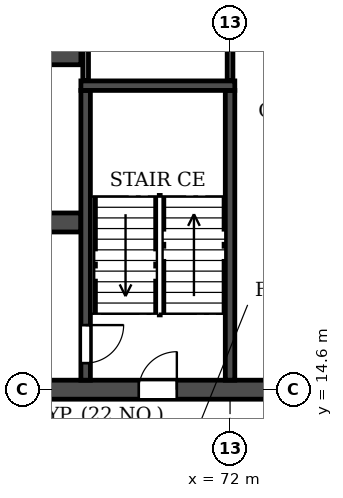
"""IFC4 building model, lengths in metres.
Left out: names, types, materials, properties, quantities, classifications, styles, units other than length and angle.
Written with IfcOpenShell. Run it as: python <this file> out.ifc"""

import sys

from ifc_helpers import new_model, si_unit, direction, frame, frame_2d, origin, place, context, subcontext, project, spatial, rectangle, extrude, element, fill, save


model = new_model("IFC4")
c1 = context("Model", 3, precision=1e-05, world=origin(), true_north=direction((0.0, 1.0)))
c2 = subcontext(c1, "Body", "Model", "MODEL_VIEW")
j1 = project(units=[si_unit("LENGTHUNIT", "METRE"), si_unit("PLANEANGLEUNIT", "RADIAN")], contexts=[c1])
p1 = place(None, origin())
s1 = spatial("IfcSite", under=j1, at=p1, CompositionType="ELEMENT")
p2 = place(p1, origin())
s2 = spatial("IfcBuilding", under=s1, at=p2, CompositionType="ELEMENT")
p3 = place(p2, frame((0.0, 0.0, 109.2)))
s3 = spatial("IfcBuildingStorey", under=s2, at=p3, CompositionType="ELEMENT", Elevation=109.2)
p4 = place(p3, frame((14.6, 14.6, 0.0), z_axis=(0.0, 0.0, 1.0), x_axis=(1.0, 0.0, 0.0)))
e1 = element("IfcWall", 1, at=p4, inside=s3, PredefinedType="SOLIDWALL", context=c2, shape_type="SweptSolid", body=[
    extrude(rectangle(XDim=72.8, YDim=0.5, at=frame_2d((36.4, 0.0))), origin(), (0.0, 0.0, 1.0), 3.06),
])
p5 = place(p4, frame((1.2, 0.0, 0.0)))
e2 = element("IfcOpeningElement", 2, at=p5, cuts=e1, PredefinedType="OPENING", context=c2, shape_type="SweptSolid", body=[
    extrude(rectangle(XDim=1.0, YDim=2.1, at=frame_2d((0.5, 1.05))), frame((0.0, 0.26, 0.0), z_axis=(0.0, -1.0, 0.0), x_axis=(1.0, 0.0, 0.0)), (0.0, 0.0, 1.0), 0.52),
])
p6 = place(p4, frame((4.3, 0.0, 0.0)))
e3 = element("IfcOpeningElement", 3, at=p6, cuts=e1, PredefinedType="OPENING", context=c2, shape_type="SweptSolid", body=[
    extrude(rectangle(XDim=1.0, YDim=2.1, at=frame_2d((0.5, 1.05))), frame((0.0, 0.26, 0.0), z_axis=(0.0, -1.0, 0.0), x_axis=(1.0, 0.0, 0.0)), (0.0, 0.0, 1.0), 0.52),
])
p7 = place(p4, frame((12.2, 0.0, 0.0)))
e4 = element("IfcOpeningElement", 4, at=p7, cuts=e1, PredefinedType="OPENING", context=c2, shape_type="SweptSolid", body=[
    extrude(rectangle(XDim=1.0, YDim=2.1, at=frame_2d((0.5, 1.05))), frame((0.0, 0.26, 0.0), z_axis=(0.0, -1.0, 0.0), x_axis=(1.0, 0.0, 0.0)), (0.0, 0.0, 1.0), 0.52),
])
p8 = place(p4, frame((16.8, 0.0, 0.0)))
e5 = element("IfcOpeningElement", 5, at=p8, cuts=e1, PredefinedType="OPENING", context=c2, shape_type="SweptSolid", body=[
    extrude(rectangle(XDim=1.0, YDim=2.1, at=frame_2d((0.5, 1.05))), frame((0.0, 0.26, 0.0), z_axis=(0.0, -1.0, 0.0), x_axis=(1.0, 0.0, 0.0)), (0.0, 0.0, 1.0), 0.52),
])
p9 = place(p4, frame((28.1, 0.0, 0.0)))
e6 = element("IfcOpeningElement", 6, at=p9, cuts=e1, PredefinedType="OPENING", context=c2, shape_type="SweptSolid", body=[
    extrude(rectangle(XDim=1.0, YDim=2.1, at=frame_2d((0.5, 1.05))), frame((0.0, 0.26, 0.0), z_axis=(0.0, -1.0, 0.0), x_axis=(1.0, 0.0, 0.0)), (0.0, 0.0, 1.0), 0.52),
])
p10 = place(p4, frame((32.0, 0.0, 0.0)))
e7 = element("IfcOpeningElement", 7, at=p10, cuts=e1, PredefinedType="OPENING", context=c2, shape_type="SweptSolid", body=[
    extrude(rectangle(XDim=1.0, YDim=2.1, at=frame_2d((0.5, 1.05))), frame((0.0, 0.26, 0.0), z_axis=(0.0, -1.0, 0.0), x_axis=(1.0, 0.0, 0.0)), (0.0, 0.0, 1.0), 0.52),
])
p11 = place(p4, frame((35.9, 0.0, 0.0)))
e8 = element("IfcOpeningElement", 8, at=p11, cuts=e1, PredefinedType="OPENING", context=c2, shape_type="SweptSolid", body=[
    extrude(rectangle(XDim=1.0, YDim=2.1, at=frame_2d((0.5, 1.05))), frame((0.0, 0.26, 0.0), z_axis=(0.0, -1.0, 0.0), x_axis=(1.0, 0.0, 0.0)), (0.0, 0.0, 1.0), 0.52),
])
p12 = place(p4, frame((39.8, 0.0, 0.0)))
e9 = element("IfcOpeningElement", 9, at=p12, cuts=e1, PredefinedType="OPENING", context=c2, shape_type="SweptSolid", body=[
    extrude(rectangle(XDim=1.0, YDim=2.1, at=frame_2d((0.5, 1.05))), frame((0.0, 0.26, 0.0), z_axis=(0.0, -1.0, 0.0), x_axis=(1.0, 0.0, 0.0)), (0.0, 0.0, 1.0), 0.52),
])
p13 = place(p4, frame((43.7, 0.0, 0.0)))
e10 = element("IfcOpeningElement", 10, at=p13, cuts=e1, PredefinedType="OPENING", context=c2, shape_type="SweptSolid", body=[
    extrude(rectangle(XDim=1.0, YDim=2.1, at=frame_2d((0.5, 1.05))), frame((0.0, 0.26, 0.0), z_axis=(0.0, -1.0, 0.0), x_axis=(1.0, 0.0, 0.0)), (0.0, 0.0, 1.0), 0.52),
])
p14 = place(p4, frame((55.0, 0.0, 0.0)))
e11 = element("IfcOpeningElement", 11, at=p14, cuts=e1, PredefinedType="OPENING", context=c2, shape_type="SweptSolid", body=[
    extrude(rectangle(XDim=1.0, YDim=2.1, at=frame_2d((0.5, 1.05))), frame((0.0, 0.26, 0.0), z_axis=(0.0, -1.0, 0.0), x_axis=(1.0, 0.0, 0.0)), (0.0, 0.0, 1.0), 0.52),
])
p15 = place(p4, frame((59.6, 0.0, 0.0)))
e12 = element("IfcOpeningElement", 12, at=p15, cuts=e1, PredefinedType="OPENING", context=c2, shape_type="SweptSolid", body=[
    extrude(rectangle(XDim=1.0, YDim=2.1, at=frame_2d((0.5, 1.05))), frame((0.0, 0.26, 0.0), z_axis=(0.0, -1.0, 0.0), x_axis=(1.0, 0.0, 0.0)), (0.0, 0.0, 1.0), 0.52),
])
p16 = place(p4, frame((67.5, 0.0, 0.0)))
e13 = element("IfcOpeningElement", 13, at=p16, cuts=e1, PredefinedType="OPENING", context=c2, shape_type="SweptSolid", body=[
    extrude(rectangle(XDim=1.0, YDim=2.1, at=frame_2d((0.5, 1.05))), frame((0.0, 0.26, 0.0), z_axis=(0.0, -1.0, 0.0), x_axis=(1.0, 0.0, 0.0)), (0.0, 0.0, 1.0), 0.52),
])
p17 = place(p4, frame((70.35, 0.0, 0.0)))
e14 = element("IfcOpeningElement", 14, at=p17, cuts=e1, PredefinedType="OPENING", context=c2, shape_type="SweptSolid", body=[
    extrude(rectangle(XDim=1.5, YDim=2.1, at=frame_2d((0.75, 1.05))), frame((0.0, 0.26, 0.0), z_axis=(0.0, -1.0, 0.0), x_axis=(1.0, 0.0, 0.0)), (0.0, 0.0, 1.0), 0.52),
])
p18 = place(p3, frame((33.925, 19.0, 0.0), z_axis=(0.0, 0.0, 1.0), x_axis=(1.0, 0.0, 0.0)))
e15 = element("IfcWall", 15, at=p18, inside=s3, PredefinedType="SOLIDWALL", context=c2, shape_type="SweptSolid", body=[
    extrude(rectangle(XDim=34.15, YDim=0.5, at=frame_2d((17.075, 0.0))), origin(), (0.0, 0.0, 1.0), 3.06),
])
p19 = place(p18, frame((16.175, 0.0, 0.0)))
e16 = element("IfcOpeningElement", 16, at=p19, cuts=e15, PredefinedType="OPENING", context=c2, shape_type="SweptSolid", body=[
    extrude(rectangle(XDim=1.8, YDim=2.1, at=frame_2d((0.9, 1.05))), frame((0.0, 0.26, 0.0), z_axis=(0.0, -1.0, 0.0), x_axis=(1.0, 0.0, 0.0)), (0.0, 0.0, 1.0), 0.52),
])
p20 = place(p18, frame((1.525, 0.0, 0.0)))
e17 = element("IfcOpeningElement", 17, at=p20, cuts=e15, PredefinedType="OPENING", context=c2, shape_type="SweptSolid", body=[
    extrude(rectangle(XDim=1.8, YDim=2.1, at=frame_2d((0.9, 1.05))), frame((0.0, 0.26, 0.0), z_axis=(0.0, -1.0, 0.0), x_axis=(1.0, 0.0, 0.0)), (0.0, 0.0, 1.0), 0.52),
])
p21 = place(p18, frame((8.725, 0.0, 0.0)))
e18 = element("IfcOpeningElement", 18, at=p21, cuts=e15, PredefinedType="OPENING", context=c2, shape_type="SweptSolid", body=[
    extrude(rectangle(XDim=1.1, YDim=2.1, at=frame_2d((0.55, 1.05))), frame((0.0, 0.26, 0.0), z_axis=(0.0, -1.0, 0.0), x_axis=(1.0, 0.0, 0.0)), (0.0, 0.0, 1.0), 0.52),
])
p22 = place(p18, frame((11.325, 0.0, 0.0)))
e19 = element("IfcOpeningElement", 19, at=p22, cuts=e15, PredefinedType="OPENING", context=c2, shape_type="SweptSolid", body=[
    extrude(rectangle(XDim=1.1, YDim=2.1, at=frame_2d((0.55, 1.05))), frame((0.0, 0.26, 0.0), z_axis=(0.0, -1.0, 0.0), x_axis=(1.0, 0.0, 0.0)), (0.0, 0.0, 1.0), 0.52),
])
p23 = place(p18, frame((13.925, 0.0, 0.0)))
e20 = element("IfcOpeningElement", 20, at=p23, cuts=e15, PredefinedType="OPENING", context=c2, shape_type="SweptSolid", body=[
    extrude(rectangle(XDim=1.1, YDim=2.1, at=frame_2d((0.55, 1.05))), frame((0.0, 0.26, 0.0), z_axis=(0.0, -1.0, 0.0), x_axis=(1.0, 0.0, 0.0)), (0.0, 0.0, 1.0), 0.52),
])
p24 = place(p18, frame((19.125, 0.0, 0.0)))
e21 = element("IfcOpeningElement", 21, at=p24, cuts=e15, PredefinedType="OPENING", context=c2, shape_type="SweptSolid", body=[
    extrude(rectangle(XDim=1.1, YDim=2.1, at=frame_2d((0.55, 1.05))), frame((0.0, 0.26, 0.0), z_axis=(0.0, -1.0, 0.0), x_axis=(1.0, 0.0, 0.0)), (0.0, 0.0, 1.0), 0.52),
])
p25 = place(p18, frame((21.725, 0.0, 0.0)))
e22 = element("IfcOpeningElement", 22, at=p25, cuts=e15, PredefinedType="OPENING", context=c2, shape_type="SweptSolid", body=[
    extrude(rectangle(XDim=1.1, YDim=2.1, at=frame_2d((0.55, 1.05))), frame((0.0, 0.26, 0.0), z_axis=(0.0, -1.0, 0.0), x_axis=(1.0, 0.0, 0.0)), (0.0, 0.0, 1.0), 0.52),
])
p26 = place(p18, frame((24.325, 0.0, 0.0)))
e23 = element("IfcOpeningElement", 23, at=p26, cuts=e15, PredefinedType="OPENING", context=c2, shape_type="SweptSolid", body=[
    extrude(rectangle(XDim=1.1, YDim=2.1, at=frame_2d((0.55, 1.05))), frame((0.0, 0.26, 0.0), z_axis=(0.0, -1.0, 0.0), x_axis=(1.0, 0.0, 0.0)), (0.0, 0.0, 1.0), 0.52),
])
p27 = place(p18, frame((30.825, 0.0, 0.0)))
e24 = element("IfcOpeningElement", 24, at=p27, cuts=e15, PredefinedType="OPENING", context=c2, shape_type="SweptSolid", body=[
    extrude(rectangle(XDim=1.8, YDim=2.1, at=frame_2d((0.9, 1.05))), frame((0.0, 0.26, 0.0), z_axis=(0.0, -1.0, 0.0), x_axis=(1.0, 0.0, 0.0)), (0.0, 0.0, 1.0), 0.52),
])
p28 = place(p3, frame((33.925, 23.4, 0.0), z_axis=(0.0, 0.0, 1.0), x_axis=(1.0, 0.0, 0.0)))
e25 = element("IfcWall", 25, at=p28, inside=s3, PredefinedType="SOLIDWALL", context=c2, shape_type="SweptSolid", body=[
    extrude(rectangle(XDim=34.15, YDim=0.5, at=frame_2d((17.075, 0.0))), origin(), (0.0, 0.0, 1.0), 3.06),
])
p29 = place(p28, frame((16.175, 0.0, 0.0)))
e26 = element("IfcOpeningElement", 26, at=p29, cuts=e25, PredefinedType="OPENING", context=c2, shape_type="SweptSolid", body=[
    extrude(rectangle(XDim=1.8, YDim=2.1, at=frame_2d((0.9, 1.05))), frame((0.0, 0.26, 0.0), z_axis=(0.0, -1.0, 0.0), x_axis=(1.0, 0.0, 0.0)), (0.0, 0.0, 1.0), 0.52),
])
p30 = place(p28, frame((11.025, 0.0, 0.0)))
e27 = element("IfcOpeningElement", 27, at=p30, cuts=e25, PredefinedType="OPENING", context=c2, shape_type="SweptSolid", body=[
    extrude(rectangle(XDim=1.1, YDim=2.1, at=frame_2d((0.55, 1.05))), frame((0.0, 0.26, 0.0), z_axis=(0.0, -1.0, 0.0), x_axis=(1.0, 0.0, 0.0)), (0.0, 0.0, 1.0), 0.52),
])
p31 = place(p3, frame((68.2, 14.85, 0.0), z_axis=(0.0, 0.0, 1.0), x_axis=(0.0, 1.0, 0.0)))
e28 = element("IfcWall", 28, at=p31, inside=s3, PredefinedType="SOLIDWALL", context=c2, shape_type="SweptSolid", body=[
    extrude(rectangle(XDim=7.625, YDim=0.25, at=frame_2d((3.812, 0.0))), origin(), (0.0, 0.0, 1.0), 3.06),
])
p32 = place(p31, frame((0.45, 0.0, 0.0)))
e29 = element("IfcOpeningElement", 29, at=p32, cuts=e28, PredefinedType="OPENING", context=c2, shape_type="SweptSolid", body=[
    extrude(rectangle(XDim=1.0, YDim=2.1, at=frame_2d((0.5, 1.05))), frame((0.0, 0.135, 0.0), z_axis=(0.0, -1.0, 0.0), x_axis=(1.0, 0.0, 0.0)), (0.0, 0.0, 1.0), 0.27),
])
p33 = place(p3, frame((72.0, 14.85, 0.0), z_axis=(0.0, 0.0, 1.0), x_axis=(0.0, 1.0, 0.0)))
e30 = element("IfcWall", 30, at=p33, inside=s3, PredefinedType="SOLIDWALL", context=c2, shape_type="SweptSolid", body=[
    extrude(rectangle(XDim=7.625, YDim=0.25, at=frame_2d((3.812, 0.0))), origin(), (0.0, 0.0, 1.0), 3.06),
])
p34 = place(p3, frame((68.075, 22.6, 0.0), z_axis=(0.0, 0.0, 1.0), x_axis=(1.0, 0.0, 0.0)))
e31 = element("IfcWall", 31, at=p34, inside=s3, PredefinedType="SOLIDWALL", context=c2, shape_type="SweptSolid", body=[
    extrude(rectangle(XDim=4.05, YDim=0.25, at=frame_2d((2.025, 0.0))), origin(), (0.0, 0.0, 1.0), 3.06),
])
for number, where, z_axis, x_axis in (
    (32, (68.2, 22.735, 0.0), (0.0, 0.0, 1.0), (0.0, 1.0, 0.0)),
    (33, (72.0, 22.735, 0.0), (0.0, 0.0, 1.0), (0.0, 1.0, 0.0)),
):
    element("IfcWall", number, at=place(p3, frame(where, z_axis=z_axis, x_axis=x_axis)), inside=s3, PredefinedType="PARTITIONING", context=c2, shape_type="SweptSolid", body=[
        extrude(rectangle(XDim=4.805, YDim=0.15, at=frame_2d((2.402, 0.0))), origin(), (0.0, 0.0, 1.0), 3.06),
    ])
p35 = place(p14, origin())
e34 = element("IfcDoor", 34, at=p35, inside=s3, OperationType="SINGLE_SWING_RIGHT", PredefinedType="DOOR", context=c2, shape_type="SweptSolid", body=[
    extrude(rectangle(XDim=1.0, YDim=2.1, at=frame_2d((0.5, 1.05))), frame((0.0, 0.025, 0.0), z_axis=(0.0, -1.0, 0.0), x_axis=(1.0, 0.0, 0.0)), (0.0, 0.0, 1.0), 0.05),
])
fill(e11, e34)
p36 = place(p32, frame((1.0, 0.0, 0.0), z_axis=(0.0, 0.0, 1.0), x_axis=(-1.0, 0.0, 0.0)))
e35 = element("IfcDoor", 35, at=p36, inside=s3, OperationType="SINGLE_SWING_LEFT", PredefinedType="DOOR", context=c2, shape_type="SweptSolid", body=[
    extrude(rectangle(XDim=1.0, YDim=2.1, at=frame_2d((0.5, 1.05))), frame((0.0, 0.025, 0.0), z_axis=(0.0, -1.0, 0.0), x_axis=(1.0, 0.0, 0.0)), (0.0, 0.0, 1.0), 0.05),
])
fill(e29, e35)
save(model, sys.argv[1])
